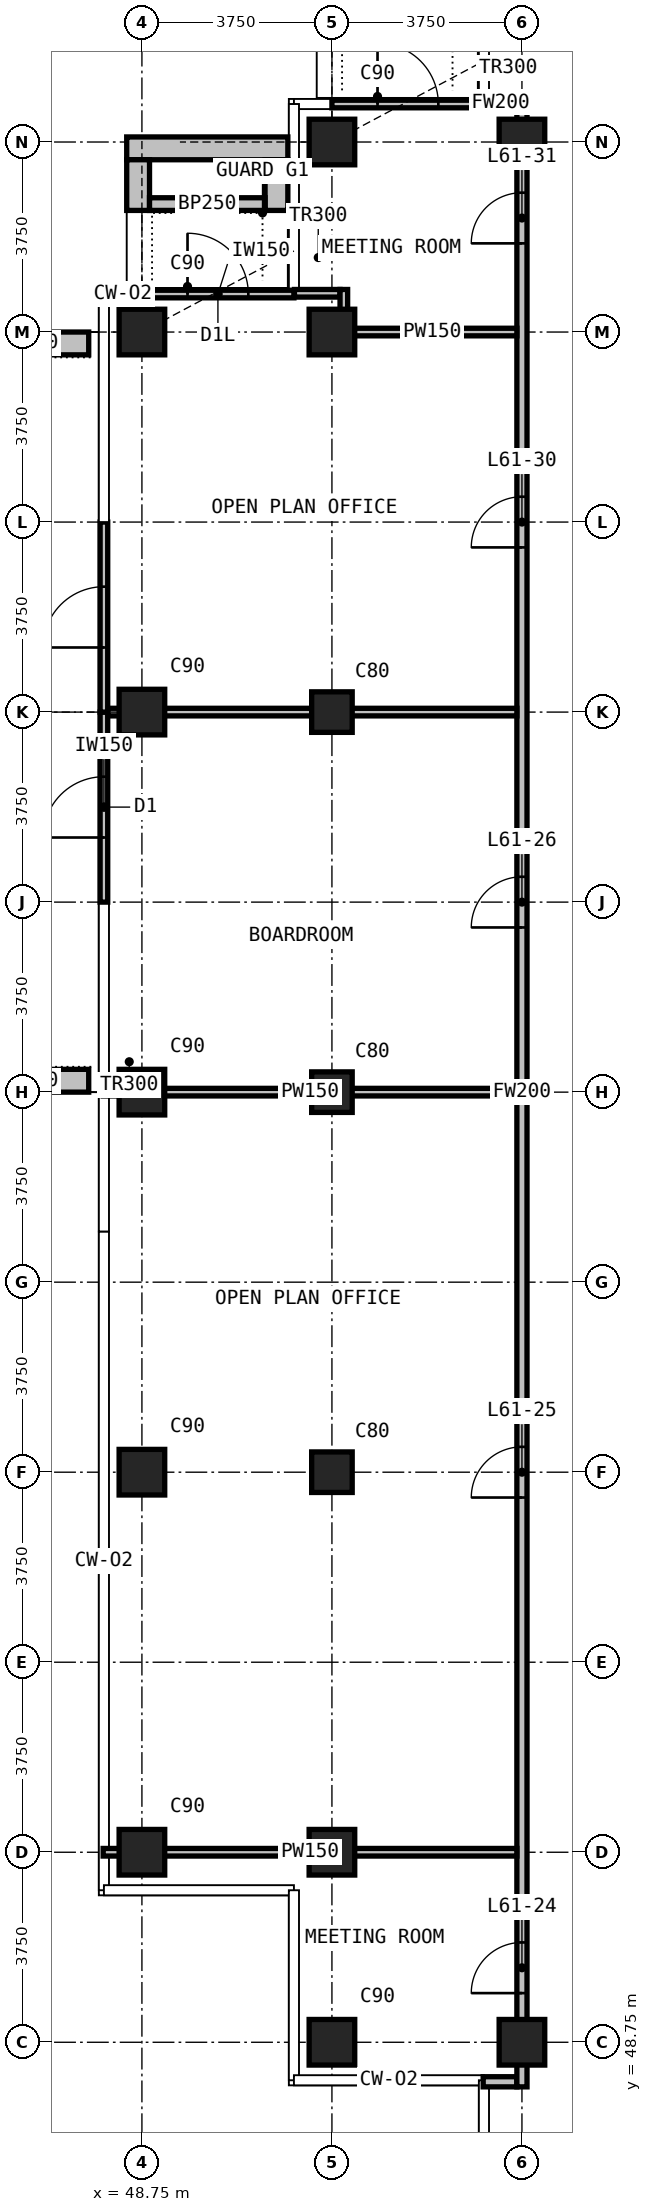
"""IFC4 building model, lengths in metres.
Left out: names, types, materials, properties, quantities, classifications, styles, units other than length and angle.
Written with IfcOpenShell. Run it as: python <this file> out.ifc"""

import sys

from ifc_helpers import new_model, si_unit, direction, frame, frame_2d, origin, origin_2d, place, context, subcontext, project, spatial, rectangle, extrude, element, fill, save


model = new_model("IFC4")
c1 = context("Model", 3, precision=1e-05, world=origin(), true_north=direction((0.0, 1.0)))
c2 = subcontext(c1, "Body", "Model", "MODEL_VIEW")
j1 = project(units=[si_unit("LENGTHUNIT", "METRE"), si_unit("PLANEANGLEUNIT", "RADIAN")], contexts=[c1])
p1 = place(None, origin())
s1 = spatial("IfcSite", under=j1, at=p1, CompositionType="ELEMENT")
p2 = place(p1, origin())
s2 = spatial("IfcBuilding", under=s1, at=p2, CompositionType="ELEMENT")
p3 = place(p2, frame((0.0, 0.0, 235.5)))
s3 = spatial("IfcBuildingStorey", under=s2, at=p3, CompositionType="ELEMENT", Elevation=235.5)
for number, where, z_axis, x_axis in (
    (1, (48.75, 52.5, 0.0), (0.0, 0.0, 1.0), (1.0, 0.0, 0.0)),
    (2, (48.75, 60.0, 0.0), (0.0, 0.0, 1.0), (1.0, 0.0, 0.0)),
    (3, (48.75, 67.5, 0.0), (0.0, 0.0, 1.0), (1.0, 0.0, 0.0)),
    (4, (48.75, 75.0, 0.0), (0.0, 0.0, 1.0), (1.0, 0.0, 0.0)),
    (5, (48.75, 82.5, 0.0), (0.0, 0.0, 1.0), (1.0, 0.0, 0.0)),
    (6, (52.5, 48.75, 0.0), (0.0, 0.0, 1.0), (1.0, 0.0, 0.0)),
    (7, (52.5, 52.5, 0.0), (0.0, 0.0, 1.0), (1.0, 0.0, 0.0)),
):
    element("IfcColumn", number, at=place(p3, frame(where, z_axis=z_axis, x_axis=x_axis)), inside=s3, PredefinedType="COLUMN", context=c2, shape_type="SweptSolid", body=[
        extrude(rectangle(XDim=0.9, YDim=0.9, at=origin_2d()), origin(), (0.0, 0.0, 1.0), 3.6),
    ])
for number, where, z_axis, x_axis in (
    (8, (52.5, 60.0, 0.0), (0.0, 0.0, 1.0), (1.0, 0.0, 0.0)),
    (9, (52.5, 67.5, 0.0), (0.0, 0.0, 1.0), (1.0, 0.0, 0.0)),
    (10, (52.5, 75.0, 0.0), (0.0, 0.0, 1.0), (1.0, 0.0, 0.0)),
):
    element("IfcColumn", number, at=place(p3, frame(where, z_axis=z_axis, x_axis=x_axis)), inside=s3, PredefinedType="COLUMN", context=c2, shape_type="SweptSolid", body=[
        extrude(rectangle(XDim=0.8, YDim=0.8, at=origin_2d()), origin(), (0.0, 0.0, 1.0), 3.6),
    ])
for number, where, z_axis, x_axis in (
    (11, (52.5, 82.5, 0.0), (0.0, 0.0, 1.0), (1.0, 0.0, 0.0)),
    (12, (52.5, 86.25, 0.0), (0.0, 0.0, 1.0), (1.0, 0.0, 0.0)),
    (13, (56.25, 48.75, 0.0), (0.0, 0.0, 1.0), (1.0, 0.0, 0.0)),
    (14, (56.25, 86.25, 0.0), (0.0, 0.0, 1.0), (1.0, 0.0, 0.0)),
):
    element("IfcColumn", number, at=place(p3, frame(where, z_axis=z_axis, x_axis=x_axis)), inside=s3, PredefinedType="COLUMN", context=c2, shape_type="SweptSolid", body=[
        extrude(rectangle(XDim=0.9, YDim=0.9, at=origin_2d()), origin(), (0.0, 0.0, 1.0), 3.6),
    ])
p4 = place(p3, frame((52.5, 87.0, 0.0), z_axis=(0.0, 0.0, 1.0), x_axis=(1.0, 0.0, 0.0)))
e15 = element("IfcWall", 15, at=p4, inside=s3, PredefinedType="SOLIDWALL", context=c2, shape_type="SweptSolid", body=[
    extrude(rectangle(XDim=3.0, YDim=0.15, at=frame_2d((1.5, 0.0))), origin(), (0.0, 0.0, 1.0), 3.3),
])
p5 = place(p4, frame((0.9, 0.0, 0.0)))
e16 = element("IfcOpeningElement", 16, at=p5, cuts=e15, PredefinedType="OPENING", context=c2, shape_type="SweptSolid", body=[
    extrude(rectangle(XDim=1.2, YDim=2.0, at=frame_2d((0.6, 1.0))), frame((0.0, 0.085, 0.0), z_axis=(0.0, -1.0, 0.0), x_axis=(1.0, 0.0, 0.0)), (0.0, 0.0, 1.0), 0.17),
])
p6 = place(p3, frame((48.75, 83.25, 0.0), z_axis=(0.0, 0.0, 1.0), x_axis=(1.0, 0.0, 0.0)))
e17 = element("IfcWall", 17, at=p6, inside=s3, PredefinedType="SOLIDWALL", context=c2, shape_type="SweptSolid", body=[
    extrude(rectangle(XDim=3.0, YDim=0.15, at=frame_2d((1.5, 0.0))), origin(), (0.0, 0.0, 1.0), 3.3),
])
p7 = place(p6, frame((0.9, 0.0, 0.0)))
e18 = element("IfcOpeningElement", 18, at=p7, cuts=e17, PredefinedType="OPENING", context=c2, shape_type="SweptSolid", body=[
    extrude(rectangle(XDim=1.2, YDim=2.0, at=frame_2d((0.6, 1.0))), frame((0.0, 0.085, 0.0), z_axis=(0.0, -1.0, 0.0), x_axis=(1.0, 0.0, 0.0)), (0.0, 0.0, 1.0), 0.17),
])
p8 = place(p3, frame((48.0, 71.25, 0.0), z_axis=(0.0, 0.0, 1.0), x_axis=(0.0, 1.0, 0.0)))
e19 = element("IfcWall", 19, at=p8, inside=s3, PredefinedType="SOLIDWALL", context=c2, shape_type="SweptSolid", body=[
    extrude(rectangle(XDim=3.75, YDim=0.15, at=frame_2d((1.875, 0.0))), origin(), (0.0, 0.0, 1.0), 3.3),
])
p9 = place(p8, frame((1.275, 0.0, 0.0)))
e20 = element("IfcOpeningElement", 20, at=p9, cuts=e19, PredefinedType="OPENING", context=c2, shape_type="SweptSolid", body=[
    extrude(rectangle(XDim=1.2, YDim=2.4, at=frame_2d((0.6, 1.2))), frame((0.0, 0.085, 0.0), z_axis=(0.0, -1.0, 0.0), x_axis=(1.0, 0.0, 0.0)), (0.0, 0.0, 1.0), 0.17),
])
p10 = place(p3, frame((48.0, 75.0, 0.0), z_axis=(0.0, 0.0, 1.0), x_axis=(0.0, 1.0, 0.0)))
e21 = element("IfcWall", 21, at=p10, inside=s3, PredefinedType="SOLIDWALL", context=c2, shape_type="SweptSolid", body=[
    extrude(rectangle(XDim=3.75, YDim=0.15, at=frame_2d((1.875, 0.0))), origin(), (0.0, 0.0, 1.0), 3.3),
])
p11 = place(p10, frame((1.275, 0.0, 0.0)))
e22 = element("IfcOpeningElement", 22, at=p11, cuts=e21, PredefinedType="OPENING", context=c2, shape_type="SweptSolid", body=[
    extrude(rectangle(XDim=1.2, YDim=2.4, at=frame_2d((0.6, 1.2))), frame((0.0, 0.085, 0.0), z_axis=(0.0, -1.0, 0.0), x_axis=(1.0, 0.0, 0.0)), (0.0, 0.0, 1.0), 0.17),
])
p12 = place(p3, frame((48.45, 86.125, 0.0), z_axis=(0.0, 0.0, 1.0), x_axis=(1.0, 0.0, 0.0)))
e23 = element("IfcWall", 23, at=p12, inside=s3, PredefinedType="USERDEFINED", context=c2, shape_type="SweptSolid", body=[
    extrude(rectangle(XDim=3.18, YDim=0.45, at=frame_2d((1.59, 0.0))), origin(), (0.0, 0.0, 1.0), 1.1),
])
for number, where, z_axis, x_axis in (
    (24, (48.675, 84.9, 0.0), (0.0, 0.0, 1.0), (0.0, 1.0, 0.0)),
    (25, (51.405, 84.9, 0.0), (0.0, 0.0, 1.0), (0.0, 1.0, 0.0)),
):
    element("IfcWall", number, at=place(p3, frame(where, z_axis=z_axis, x_axis=x_axis)), inside=s3, PredefinedType="USERDEFINED", context=c2, shape_type="SweptSolid", body=[
        extrude(rectangle(XDim=1.0, YDim=0.45, at=frame_2d((0.5, 0.0))), origin(), (0.0, 0.0, 1.0), 1.1),
    ])
p13 = place(p3, frame((48.9, 85.025, 0.0), z_axis=(0.0, 0.0, 1.0), x_axis=(1.0, 0.0, 0.0)))
e26 = element("IfcWall", 26, at=p13, inside=s3, PredefinedType="USERDEFINED", context=c2, shape_type="SweptSolid", body=[
    extrude(rectangle(XDim=2.28, YDim=0.25, at=frame_2d((1.14, 0.0))), origin(), (0.0, 0.0, 1.0), 1.0),
])
for number, where, z_axis, x_axis in (
    (27, (47.7, 67.725, 0.0), (0.0, 0.0, 1.0), (-1.0, 0.0, 0.0)),
    (28, (47.7, 82.275, 0.0), (0.0, 0.0, 1.0), (-1.0, 0.0, 0.0)),
):
    element("IfcWall", number, at=place(p3, frame(where, z_axis=z_axis, x_axis=x_axis)), inside=s3, PredefinedType="USERDEFINED", context=c2, shape_type="SweptSolid", body=[
        extrude(rectangle(XDim=2.35, YDim=0.45, at=frame_2d((1.175, 0.0))), origin(), (0.0, 0.0, 1.0), 1.1),
    ])
p14 = place(p3, frame((55.485, 47.97, 0.0), z_axis=(0.0, 0.0, 1.0), x_axis=(1.0, 0.0, 0.0)))
e29 = element("IfcWall", 29, at=p14, inside=s3, PredefinedType="PARTITIONING", context=c2, shape_type="SweptSolid", body=[
    extrude(rectangle(XDim=0.665, YDim=0.2, at=frame_2d((0.333, 0.0))), origin(), (0.0, 0.0, 1.0), 3.3),
])
p15 = place(p3, frame((55.51, 87.03, 0.0), z_axis=(0.0, 0.0, 1.0), x_axis=(1.0, 0.0, 0.0)))
e30 = element("IfcWall", 30, at=p15, inside=s3, PredefinedType="PARTITIONING", context=c2, shape_type="SweptSolid", body=[
    extrude(rectangle(XDim=0.64, YDim=0.2, at=frame_2d((0.32, 0.0))), origin(), (0.0, 0.0, 1.0), 3.3),
])
p16 = place(p3, frame((56.25, 47.87, 0.0), z_axis=(0.0, 0.0, 1.0), x_axis=(0.0, 1.0, 0.0)))
e31 = element("IfcWall", 31, at=p16, inside=s3, PredefinedType="PARTITIONING", context=c2, shape_type="SweptSolid", body=[
    extrude(rectangle(XDim=39.26, YDim=0.2, at=frame_2d((19.63, 0.0))), origin(), (0.0, 0.0, 1.0), 3.3),
])
p17 = place(p16, frame((1.85, 0.0, 0.0)))
e32 = element("IfcOpeningElement", 32, at=p17, cuts=e31, PredefinedType="OPENING", context=c2, shape_type="SweptSolid", body=[
    extrude(rectangle(XDim=1.0, YDim=2.2, at=frame_2d((0.5, 1.1))), frame((0.0, 0.11, 0.0), z_axis=(0.0, -1.0, 0.0), x_axis=(1.0, 0.0, 0.0)), (0.0, 0.0, 1.0), 0.22),
])
p18 = place(p16, frame((11.63, 0.0, 0.0)))
e33 = element("IfcOpeningElement", 33, at=p18, cuts=e31, PredefinedType="OPENING", context=c2, shape_type="SweptSolid", body=[
    extrude(rectangle(XDim=1.0, YDim=2.2, at=frame_2d((0.5, 1.1))), frame((0.0, 0.11, 0.0), z_axis=(0.0, -1.0, 0.0), x_axis=(1.0, 0.0, 0.0)), (0.0, 0.0, 1.0), 0.22),
])
p19 = place(p16, frame((22.88, 0.0, 0.0)))
e34 = element("IfcOpeningElement", 34, at=p19, cuts=e31, PredefinedType="OPENING", context=c2, shape_type="SweptSolid", body=[
    extrude(rectangle(XDim=1.0, YDim=2.2, at=frame_2d((0.5, 1.1))), frame((0.0, 0.11, 0.0), z_axis=(0.0, -1.0, 0.0), x_axis=(1.0, 0.0, 0.0)), (0.0, 0.0, 1.0), 0.22),
])
p20 = place(p16, frame((30.38, 0.0, 0.0)))
e35 = element("IfcOpeningElement", 35, at=p20, cuts=e31, PredefinedType="OPENING", context=c2, shape_type="SweptSolid", body=[
    extrude(rectangle(XDim=1.0, YDim=2.2, at=frame_2d((0.5, 1.1))), frame((0.0, 0.11, 0.0), z_axis=(0.0, -1.0, 0.0), x_axis=(1.0, 0.0, 0.0)), (0.0, 0.0, 1.0), 0.22),
])
p21 = place(p16, frame((36.38, 0.0, 0.0)))
e36 = element("IfcOpeningElement", 36, at=p21, cuts=e31, PredefinedType="OPENING", context=c2, shape_type="SweptSolid", body=[
    extrude(rectangle(XDim=1.0, YDim=2.2, at=frame_2d((0.5, 1.1))), frame((0.0, 0.11, 0.0), z_axis=(0.0, -1.0, 0.0), x_axis=(1.0, 0.0, 0.0)), (0.0, 0.0, 1.0), 0.22),
])
for number, where, z_axis, x_axis in (
    (37, (47.985, 52.5, 0.0), (0.0, 0.0, 1.0), (1.0, 0.0, 0.0)),
    (38, (47.985, 67.5, 0.0), (0.0, 0.0, 1.0), (1.0, 0.0, 0.0)),
):
    element("IfcWall", number, at=place(p3, frame(where, z_axis=z_axis, x_axis=x_axis)), inside=s3, PredefinedType="PARTITIONING", context=c2, shape_type="SweptSolid", body=[
        extrude(rectangle(XDim=8.165, YDim=0.15, at=frame_2d((4.083, 0.0))), origin(), (0.0, 0.0, 1.0), 3.3),
    ])
p22 = place(p3, frame((48.085, 75.0, 0.0), z_axis=(0.0, 0.0, 1.0), x_axis=(1.0, 0.0, 0.0)))
e39 = element("IfcWall", 39, at=p22, inside=s3, PredefinedType="PARTITIONING", context=c2, shape_type="SweptSolid", body=[
    extrude(rectangle(XDim=8.065, YDim=0.15, at=frame_2d((4.032, 0.0))), origin(), (0.0, 0.0, 1.0), 3.3),
])
p23 = place(p3, frame((52.81, 82.5, 0.0), z_axis=(0.0, 0.0, 1.0), x_axis=(1.0, 0.0, 0.0)))
e40 = element("IfcWall", 40, at=p23, inside=s3, PredefinedType="PARTITIONING", context=c2, shape_type="SweptSolid", body=[
    extrude(rectangle(XDim=3.34, YDim=0.15, at=frame_2d((1.67, 0.0))), origin(), (0.0, 0.0, 1.0), 3.3),
])
p24 = place(p3, frame((51.76, 83.265, 0.0), z_axis=(0.0, 0.0, 1.0), x_axis=(1.0, 0.0, 0.0)))
e41 = element("IfcWall", 41, at=p24, inside=s3, PredefinedType="PARTITIONING", context=c2, shape_type="SweptSolid", body=[
    extrude(rectangle(XDim=0.9, YDim=0.15, at=frame_2d((0.45, 0.0))), origin(), (0.0, 0.0, 1.0), 3.3),
])
p25 = place(p3, frame((52.735, 82.425, 0.0), z_axis=(0.0, 0.0, 1.0), x_axis=(0.0, 1.0, 0.0)))
e42 = element("IfcWall", 42, at=p25, inside=s3, PredefinedType="PARTITIONING", context=c2, shape_type="SweptSolid", body=[
    extrude(rectangle(XDim=0.915, YDim=0.15, at=frame_2d((0.458, 0.0))), origin(), (0.0, 0.0, 1.0), 3.3),
])
p26 = place(p5, origin())
e43 = element("IfcDoor", 43, at=p26, inside=s3, OperationType="SINGLE_SWING_LEFT", PredefinedType="DOOR", context=c2, shape_type="SweptSolid", body=[
    extrude(rectangle(XDim=1.2, YDim=2.0, at=frame_2d((0.6, 1.0))), frame((0.0, 0.025, 0.0), z_axis=(0.0, -1.0, 0.0), x_axis=(1.0, 0.0, 0.0)), (0.0, 0.0, 1.0), 0.05),
])
fill(e16, e43)
p27 = place(p7, origin())
e44 = element("IfcDoor", 44, at=p27, inside=s3, OperationType="SINGLE_SWING_LEFT", PredefinedType="DOOR", context=c2, shape_type="SweptSolid", body=[
    extrude(rectangle(XDim=1.2, YDim=2.0, at=frame_2d((0.6, 1.0))), frame((0.0, 0.025, 0.0), z_axis=(0.0, -1.0, 0.0), x_axis=(1.0, 0.0, 0.0)), (0.0, 0.0, 1.0), 0.05),
])
fill(e18, e44)
p28 = place(p9, origin())
e45 = element("IfcDoor", 45, at=p28, inside=s3, OperationType="SINGLE_SWING_LEFT", PredefinedType="DOOR", context=c2, shape_type="SweptSolid", body=[
    extrude(rectangle(XDim=1.2, YDim=2.4, at=frame_2d((0.6, 1.2))), frame((0.0, 0.025, 0.0), z_axis=(0.0, -1.0, 0.0), x_axis=(1.0, 0.0, 0.0)), (0.0, 0.0, 1.0), 0.05),
])
fill(e20, e45)
p29 = place(p11, origin())
e46 = element("IfcDoor", 46, at=p29, inside=s3, OperationType="SINGLE_SWING_LEFT", PredefinedType="DOOR", context=c2, shape_type="SweptSolid", body=[
    extrude(rectangle(XDim=1.2, YDim=2.4, at=frame_2d((0.6, 1.2))), frame((0.0, 0.025, 0.0), z_axis=(0.0, -1.0, 0.0), x_axis=(1.0, 0.0, 0.0)), (0.0, 0.0, 1.0), 0.05),
])
fill(e22, e46)
p30 = place(p17, origin())
e47 = element("IfcDoor", 47, at=p30, inside=s3, OperationType="SINGLE_SWING_RIGHT", PredefinedType="DOOR", context=c2, shape_type="SweptSolid", body=[
    extrude(rectangle(XDim=1.0, YDim=2.2, at=frame_2d((0.5, 1.1))), frame((0.0, 0.025, 0.0), z_axis=(0.0, -1.0, 0.0), x_axis=(1.0, 0.0, 0.0)), (0.0, 0.0, 1.0), 0.05),
])
fill(e32, e47)
p31 = place(p18, origin())
e48 = element("IfcDoor", 48, at=p31, inside=s3, OperationType="SINGLE_SWING_LEFT", PredefinedType="DOOR", context=c2, shape_type="SweptSolid", body=[
    extrude(rectangle(XDim=1.0, YDim=2.2, at=frame_2d((0.5, 1.1))), frame((0.0, 0.025, 0.0), z_axis=(0.0, -1.0, 0.0), x_axis=(1.0, 0.0, 0.0)), (0.0, 0.0, 1.0), 0.05),
])
fill(e33, e48)
p32 = place(p19, origin())
e49 = element("IfcDoor", 49, at=p32, inside=s3, OperationType="SINGLE_SWING_LEFT", PredefinedType="DOOR", context=c2, shape_type="SweptSolid", body=[
    extrude(rectangle(XDim=1.0, YDim=2.2, at=frame_2d((0.5, 1.1))), frame((0.0, 0.025, 0.0), z_axis=(0.0, -1.0, 0.0), x_axis=(1.0, 0.0, 0.0)), (0.0, 0.0, 1.0), 0.05),
])
fill(e34, e49)
p33 = place(p20, origin())
e50 = element("IfcDoor", 50, at=p33, inside=s3, OperationType="SINGLE_SWING_LEFT", PredefinedType="DOOR", context=c2, shape_type="SweptSolid", body=[
    extrude(rectangle(XDim=1.0, YDim=2.2, at=frame_2d((0.5, 1.1))), frame((0.0, 0.025, 0.0), z_axis=(0.0, -1.0, 0.0), x_axis=(1.0, 0.0, 0.0)), (0.0, 0.0, 1.0), 0.05),
])
fill(e35, e50)
p34 = place(p21, origin())
e51 = element("IfcDoor", 51, at=p34, inside=s3, OperationType="SINGLE_SWING_LEFT", PredefinedType="DOOR", context=c2, shape_type="SweptSolid", body=[
    extrude(rectangle(XDim=1.0, YDim=2.2, at=frame_2d((0.5, 1.1))), frame((0.0, 0.025, 0.0), z_axis=(0.0, -1.0, 0.0), x_axis=(1.0, 0.0, 0.0)), (0.0, 0.0, 1.0), 0.05),
])
fill(e36, e51)
save(model, sys.argv[1])
